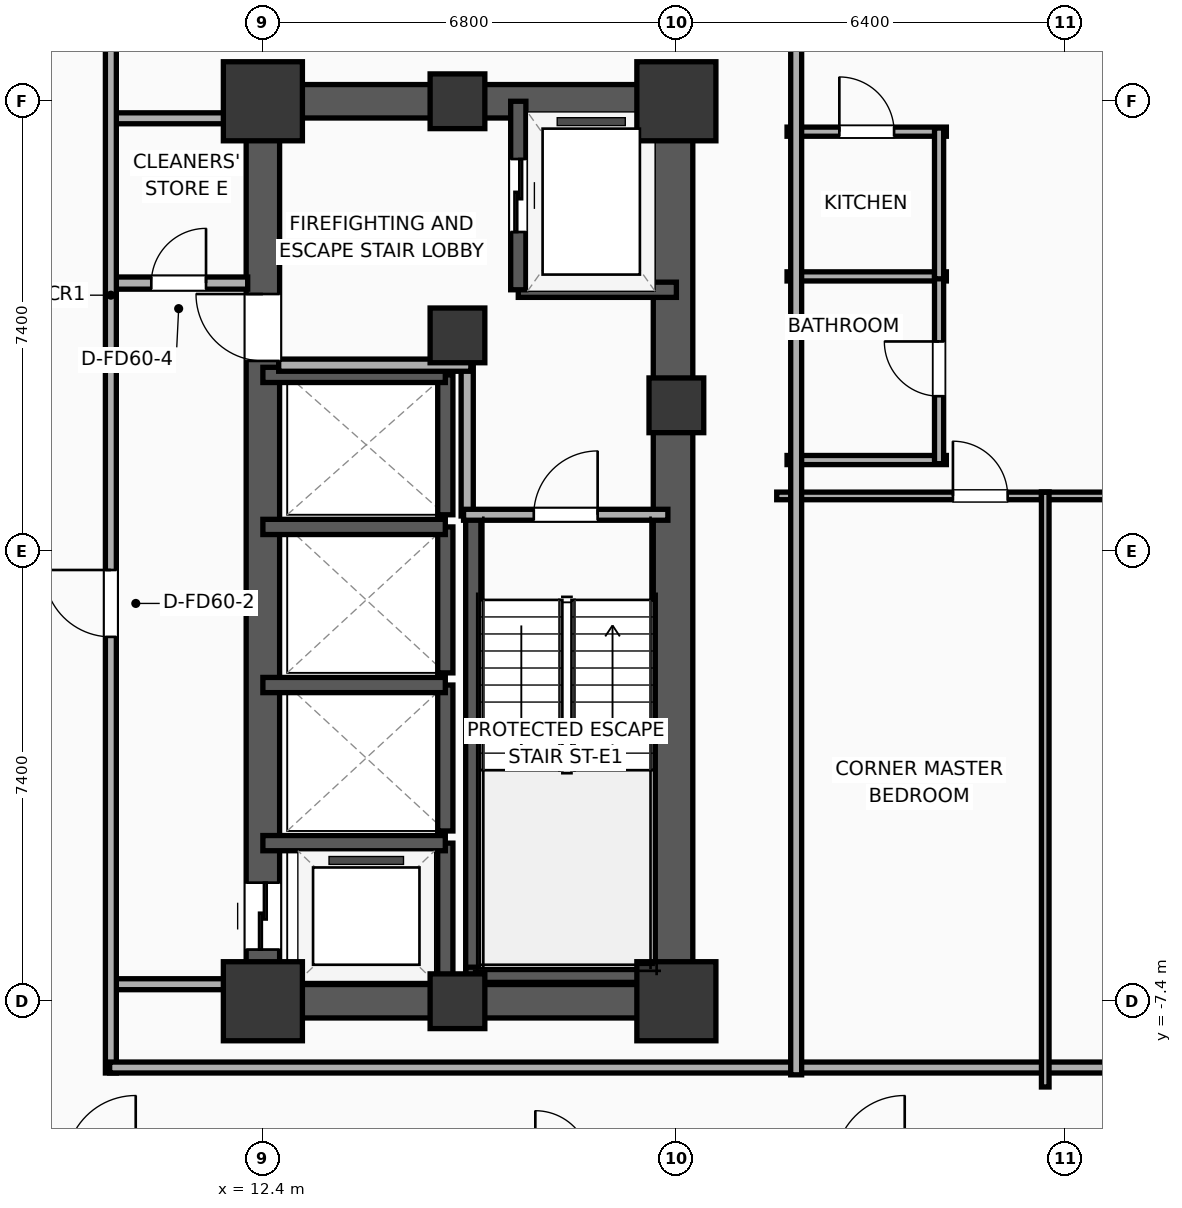
"""IFC4 building model, lengths in metres.
Left out: names, types, materials, properties, quantities, classifications, styles, units other than length and angle.
Written with IfcOpenShell. Run it as: python <this file> out.ifc"""

import sys

from ifc_helpers import new_model, si_unit, direction, frame, frame_2d, origin, origin_2d, place, context, subcontext, project, spatial, rectangle, extrude, element, fill, save


model = new_model("IFC4")
c1 = context("Model", 3, precision=1e-05, world=origin(), true_north=direction((0.0, 1.0)))
c2 = subcontext(c1, "Body", "Model", "MODEL_VIEW")
j1 = project(units=[si_unit("LENGTHUNIT", "METRE"), si_unit("PLANEANGLEUNIT", "RADIAN")], contexts=[c1])
p1 = place(None, origin())
s1 = spatial("IfcSite", under=j1, at=p1, CompositionType="ELEMENT")
p2 = place(p1, origin())
s2 = spatial("IfcBuilding", under=s1, at=p2, CompositionType="ELEMENT")
p3 = place(p2, frame((0.0, 0.0, 124.8)))
s3 = spatial("IfcBuildingStorey", under=s2, at=p3, CompositionType="ELEMENT", Elevation=124.8)
p4 = place(p3, frame((12.4, -7.4, 0.0), z_axis=(0.0, 0.0, 1.0), x_axis=(1.0, 0.0, 0.0)))
e1 = element("IfcColumn", 1, at=p4, inside=s3, PredefinedType="COLUMN", context=c2, shape_type="SweptSolid", body=[
    extrude(rectangle(XDim=1.3, YDim=1.3, at=origin_2d()), origin(), (0.0, 0.0, 1.0), 3.9),
])
p5 = place(p3, frame((15.6, 3.55, 0.0), z_axis=(0.0, 0.0, 1.0), x_axis=(1.0, 0.0, 0.0)))
e2 = element("IfcColumn", 2, at=p5, inside=s3, PredefinedType="COLUMN", context=c2, shape_type="SweptSolid", body=[
    extrude(rectangle(XDim=0.9, YDim=0.9, at=origin_2d()), origin(), (0.0, 0.0, 1.0), 3.9),
])
p6 = place(p3, frame((12.4, 7.4, 0.0), z_axis=(0.0, 0.0, 1.0), x_axis=(1.0, 0.0, 0.0)))
e3 = element("IfcColumn", 3, at=p6, inside=s3, PredefinedType="COLUMN", context=c2, shape_type="SweptSolid", body=[
    extrude(rectangle(XDim=1.3, YDim=1.3, at=origin_2d()), origin(), (0.0, 0.0, 1.0), 3.9),
])
for number, where, z_axis, x_axis in (
    (4, (15.6, -7.4, 0.0), (0.0, 0.0, 1.0), (1.0, 0.0, 0.0)),
    (5, (15.6, 7.4, 0.0), (0.0, 0.0, 1.0), (1.0, 0.0, 0.0)),
):
    element("IfcColumn", number, at=place(p3, frame(where, z_axis=z_axis, x_axis=x_axis)), inside=s3, PredefinedType="COLUMN", context=c2, shape_type="SweptSolid", body=[
        extrude(rectangle(XDim=0.9, YDim=0.9, at=origin_2d()), origin(), (0.0, 0.0, 1.0), 3.9),
    ])
p7 = place(p3, frame((19.2, -7.4, 0.0), z_axis=(0.0, 0.0, 1.0), x_axis=(1.0, 0.0, 0.0)))
e6 = element("IfcColumn", 6, at=p7, inside=s3, PredefinedType="COLUMN", context=c2, shape_type="SweptSolid", body=[
    extrude(rectangle(XDim=1.3, YDim=1.3, at=origin_2d()), origin(), (0.0, 0.0, 1.0), 3.9),
])
p8 = place(p3, frame((19.2, 2.4, 0.0), z_axis=(0.0, 0.0, 1.0), x_axis=(1.0, 0.0, 0.0)))
e7 = element("IfcColumn", 7, at=p8, inside=s3, PredefinedType="COLUMN", context=c2, shape_type="SweptSolid", body=[
    extrude(rectangle(XDim=0.9, YDim=0.9, at=origin_2d()), origin(), (0.0, 0.0, 1.0), 3.9),
])
p9 = place(p3, frame((19.2, 7.4, 0.0), z_axis=(0.0, 0.0, 1.0), x_axis=(1.0, 0.0, 0.0)))
e8 = element("IfcColumn", 8, at=p9, inside=s3, PredefinedType="COLUMN", context=c2, shape_type="SweptSolid", body=[
    extrude(rectangle(XDim=1.3, YDim=1.3, at=origin_2d()), origin(), (0.0, 0.0, 1.0), 3.9),
])
for number, where, z_axis, x_axis in (
    (9, (12.125, -7.4, 0.0), (0.0, 0.0, 1.0), (1.0, 0.0, 0.0)),
    (10, (12.125, 7.4, 0.0), (0.0, 0.0, 1.0), (1.0, 0.0, 0.0)),
):
    element("IfcWall", number, at=place(p3, frame(where, z_axis=z_axis, x_axis=x_axis)), inside=s3, PredefinedType="SHEAR", context=c2, shape_type="SweptSolid", body=[
        extrude(rectangle(XDim=7.35, YDim=0.55, at=frame_2d((3.675, 0.0))), origin(), (0.0, 0.0, 1.0), 3.65),
    ])
p10 = place(p3, frame((12.4, -7.4, 0.0), z_axis=(0.0, 0.0, 1.0), x_axis=(0.0, 1.0, 0.0)))
e11 = element("IfcWall", 11, at=p10, inside=s3, PredefinedType="SHEAR", context=c2, shape_type="SweptSolid", body=[
    extrude(rectangle(XDim=14.8, YDim=0.55, at=frame_2d((7.4, 0.0))), origin(), (0.0, 0.0, 1.0), 3.65),
])
p11 = place(p10, frame((0.85, 0.0, 0.0)))
e12 = element("IfcOpeningElement", 12, at=p11, cuts=e11, PredefinedType="OPENING", context=c2, shape_type="SweptSolid", body=[
    extrude(rectangle(XDim=1.1, YDim=2.05, at=frame_2d((0.55, 1.025))), frame((0.0, 0.285, 0.0), z_axis=(0.0, -1.0, 0.0), x_axis=(1.0, 0.0, 0.0)), (0.0, 0.0, 1.0), 0.57),
])
p12 = place(p10, frame((10.53, 0.0, 0.0)))
e13 = element("IfcOpeningElement", 13, at=p12, cuts=e11, PredefinedType="OPENING", context=c2, shape_type="SweptSolid", body=[
    extrude(rectangle(XDim=1.1, YDim=2.05, at=frame_2d((0.55, 1.025))), frame((0.0, 0.285, 0.0), z_axis=(0.0, -1.0, 0.0), x_axis=(1.0, 0.0, 0.0)), (0.0, 0.0, 1.0), 0.57),
])
p13 = place(p3, frame((19.145, -7.4, 0.0), z_axis=(0.0, 0.0, 1.0), x_axis=(0.0, 1.0, 0.0)))
e14 = element("IfcWall", 14, at=p13, inside=s3, PredefinedType="SHEAR", context=c2, shape_type="SweptSolid", body=[
    extrude(rectangle(XDim=14.8, YDim=0.65, at=frame_2d((7.4, 0.0))), origin(), (0.0, 0.0, 1.0), 3.65),
])
p14 = place(p3, frame((15.86, -7.085, 0.0), z_axis=(0.0, 0.0, 1.0), x_axis=(0.0, 1.0, 0.0)))
e15 = element("IfcWall", 15, at=p14, inside=s3, PredefinedType="SOLIDWALL", context=c2, shape_type="SweptSolid", body=[
    extrude(rectangle(XDim=7.685, YDim=0.25, at=frame_2d((3.843, 0.0))), origin(), (0.0, 0.0, 1.0), 3.65),
])
p15 = place(p3, frame((15.74, -6.965, 0.0), z_axis=(0.0, 0.0, 1.0), x_axis=(1.0, 0.0, 0.0)))
e16 = element("IfcWall", 16, at=p15, inside=s3, PredefinedType="SOLIDWALL", context=c2, shape_type="SweptSolid", body=[
    extrude(rectangle(XDim=3.46, YDim=0.25, at=frame_2d((1.73, 0.0))), origin(), (0.0, 0.0, 1.0), 3.65),
])
p16 = place(p3, frame((16.6, 4.3, 0.0), z_axis=(0.0, 0.0, 1.0), x_axis=(1.0, 0.0, 0.0)))
e17 = element("IfcWall", 17, at=p16, inside=s3, PredefinedType="SOLIDWALL", context=c2, shape_type="SweptSolid", body=[
    extrude(rectangle(XDim=2.6, YDim=0.25, at=frame_2d((1.3, 0.0))), origin(), (0.0, 0.0, 1.0), 3.65),
])
p17 = place(p3, frame((16.6, 7.4, 0.0), z_axis=(0.0, 0.0, 1.0), x_axis=(0.0, -1.0, 0.0)))
e18 = element("IfcWall", 18, at=p17, inside=s3, PredefinedType="SOLIDWALL", context=c2, shape_type="SweptSolid", body=[
    extrude(rectangle(XDim=3.1, YDim=0.25, at=frame_2d((1.55, 0.0))), origin(), (0.0, 0.0, 1.0), 3.65),
])
p18 = place(p17, frame((0.95, 0.0, 0.0)))
e19 = element("IfcOpeningElement", 19, at=p18, cuts=e18, PredefinedType="OPENING", context=c2, shape_type="SweptSolid", body=[
    extrude(rectangle(XDim=1.2, YDim=2.05, at=frame_2d((0.6, 1.025))), frame((0.0, 0.135, 0.0), z_axis=(0.0, -1.0, 0.0), x_axis=(1.0, 0.0, 0.0)), (0.0, 0.0, 1.0), 0.27),
])
p19 = place(p3, frame((15.4, -7.4, 0.0), z_axis=(0.0, 0.0, 1.0), x_axis=(0.0, 1.0, 0.0)))
e20 = element("IfcWall", 20, at=p19, inside=s3, PredefinedType="SOLIDWALL", context=c2, shape_type="SweptSolid", body=[
    extrude(rectangle(XDim=2.6, YDim=0.25, at=frame_2d((1.3, 0.0))), origin(), (0.0, 0.0, 1.0), 3.65),
])
p20 = place(p3, frame((15.4, -4.8, 0.0), z_axis=(0.0, 0.0, 1.0), x_axis=(-1.0, 0.0, 0.0)))
e21 = element("IfcWall", 21, at=p20, inside=s3, PredefinedType="SOLIDWALL", context=c2, shape_type="SweptSolid", body=[
    extrude(rectangle(XDim=3.0, YDim=0.25, at=frame_2d((1.5, 0.0))), origin(), (0.0, 0.0, 1.0), 3.65),
])
p21 = place(p3, frame((15.4, -4.6, 0.0), z_axis=(0.0, 0.0, 1.0), x_axis=(0.0, 1.0, 0.0)))
e22 = element("IfcWall", 22, at=p21, inside=s3, PredefinedType="SOLIDWALL", context=c2, shape_type="SweptSolid", body=[
    extrude(rectangle(XDim=2.4, YDim=0.25, at=frame_2d((1.2, 0.0))), origin(), (0.0, 0.0, 1.0), 3.65),
])
p22 = place(p3, frame((15.4, -2.2, 0.0), z_axis=(0.0, 0.0, 1.0), x_axis=(-1.0, 0.0, 0.0)))
e23 = element("IfcWall", 23, at=p22, inside=s3, PredefinedType="SOLIDWALL", context=c2, shape_type="SweptSolid", body=[
    extrude(rectangle(XDim=3.0, YDim=0.25, at=frame_2d((1.5, 0.0))), origin(), (0.0, 0.0, 1.0), 3.65),
])
p23 = place(p3, frame((15.4, -2.0, 0.0), z_axis=(0.0, 0.0, 1.0), x_axis=(0.0, 1.0, 0.0)))
e24 = element("IfcWall", 24, at=p23, inside=s3, PredefinedType="SOLIDWALL", context=c2, shape_type="SweptSolid", body=[
    extrude(rectangle(XDim=2.4, YDim=0.25, at=frame_2d((1.2, 0.0))), origin(), (0.0, 0.0, 1.0), 3.65),
])
p24 = place(p3, frame((15.4, 0.4, 0.0), z_axis=(0.0, 0.0, 1.0), x_axis=(-1.0, 0.0, 0.0)))
e25 = element("IfcWall", 25, at=p24, inside=s3, PredefinedType="SOLIDWALL", context=c2, shape_type="SweptSolid", body=[
    extrude(rectangle(XDim=3.0, YDim=0.25, at=frame_2d((1.5, 0.0))), origin(), (0.0, 0.0, 1.0), 3.65),
])
p25 = place(p3, frame((15.4, 0.6, 0.0), z_axis=(0.0, 0.0, 1.0), x_axis=(0.0, 1.0, 0.0)))
e26 = element("IfcWall", 26, at=p25, inside=s3, PredefinedType="SOLIDWALL", context=c2, shape_type="SweptSolid", body=[
    extrude(rectangle(XDim=2.3, YDim=0.25, at=frame_2d((1.15, 0.0))), origin(), (0.0, 0.0, 1.0), 3.65),
])
p26 = place(p3, frame((15.4, 2.9, 0.0), z_axis=(0.0, 0.0, 1.0), x_axis=(-1.0, 0.0, 0.0)))
e27 = element("IfcWall", 27, at=p26, inside=s3, PredefinedType="SOLIDWALL", context=c2, shape_type="SweptSolid", body=[
    extrude(rectangle(XDim=3.0, YDim=0.25, at=frame_2d((1.5, 0.0))), origin(), (0.0, 0.0, 1.0), 3.65),
])
p27 = place(p3, frame((15.76, 0.58, 0.0), z_axis=(0.0, 0.0, 1.0), x_axis=(0.0, 1.0, 0.0)))
e28 = element("IfcWall", 28, at=p27, inside=s3, PredefinedType="PARTITIONING", context=c2, shape_type="SweptSolid", body=[
    extrude(rectangle(XDim=2.52, YDim=0.2, at=frame_2d((1.26, 0.0))), origin(), (0.0, 0.0, 1.0), 3.65),
])
p28 = place(p3, frame((12.66, 3.06, 0.0), z_axis=(0.0, 0.0, 1.0), x_axis=(1.0, 0.0, 0.0)))
e29 = element("IfcWall", 29, at=p28, inside=s3, PredefinedType="PARTITIONING", context=c2, shape_type="SweptSolid", body=[
    extrude(rectangle(XDim=3.16, YDim=0.2, at=frame_2d((1.58, 0.0))), origin(), (0.0, 0.0, 1.0), 3.65),
])
p29 = place(p3, frame((15.7, 0.6, 0.0), z_axis=(0.0, 0.0, 1.0), x_axis=(1.0, 0.0, 0.0)))
e30 = element("IfcWall", 30, at=p29, inside=s3, PredefinedType="PARTITIONING", context=c2, shape_type="SweptSolid", body=[
    extrude(rectangle(XDim=3.36, YDim=0.18, at=frame_2d((1.68, 0.0))), origin(), (0.0, 0.0, 1.0), 3.65),
])
p30 = place(p29, frame((1.155, 0.0, 0.0)))
e31 = element("IfcOpeningElement", 31, at=p30, cuts=e30, PredefinedType="OPENING", context=c2, shape_type="SweptSolid", body=[
    extrude(rectangle(XDim=1.05, YDim=2.05, at=frame_2d((0.525, 1.025))), frame((0.0, 0.1, 0.0), z_axis=(0.0, -1.0, 0.0), x_axis=(1.0, 0.0, 0.0)), (0.0, 0.0, 1.0), 0.2),
])
p31 = place(p3, frame((9.88, 4.41, 0.0), z_axis=(0.0, 0.0, 1.0), x_axis=(1.0, 0.0, 0.0)))
e32 = element("IfcWall", 32, at=p31, inside=s3, PredefinedType="PARTITIONING", context=c2, shape_type="SweptSolid", body=[
    extrude(rectangle(XDim=2.27, YDim=0.2, at=frame_2d((1.135, 0.0))), origin(), (0.0, 0.0, 1.0), 3.65),
])
p32 = place(p31, frame((0.685, 0.0, 0.0)))
e33 = element("IfcOpeningElement", 33, at=p32, cuts=e32, PredefinedType="OPENING", context=c2, shape_type="SweptSolid", body=[
    extrude(rectangle(XDim=0.9, YDim=2.05, at=frame_2d((0.45, 1.025))), frame((0.0, 0.11, 0.0), z_axis=(0.0, -1.0, 0.0), x_axis=(1.0, 0.0, 0.0)), (0.0, 0.0, 1.0), 0.22),
])
for number, where, z_axis, x_axis in (
    (34, (9.88, 7.12, 0.0), (0.0, 0.0, 1.0), (1.0, 0.0, 0.0)),
    (35, (9.88, -7.12, 0.0), (0.0, 0.0, 1.0), (1.0, 0.0, 0.0)),
):
    element("IfcWall", number, at=place(p3, frame(where, z_axis=z_axis, x_axis=x_axis)), inside=s3, PredefinedType="PARTITIONING", context=c2, shape_type="SweptSolid", body=[
        extrude(rectangle(XDim=2.27, YDim=0.18, at=frame_2d((1.135, 0.0))), origin(), (0.0, 0.0, 1.0), 3.65),
    ])
p33 = place(p3, frame((9.9, -8.58, 0.0), z_axis=(0.0, 0.0, 1.0), x_axis=(0.0, 1.0, 0.0)))
e36 = element("IfcWall", 36, at=p33, inside=s3, PredefinedType="PARTITIONING", context=c2, shape_type="SweptSolid", body=[
    extrude(rectangle(XDim=17.16, YDim=0.18, at=frame_2d((8.58, 0.0))), origin(), (0.0, 0.0, 1.0), 3.65),
])
p34 = place(p33, frame((7.172, 0.0, 0.0)))
e37 = element("IfcOpeningElement", 37, at=p34, cuts=e36, PredefinedType="OPENING", context=c2, shape_type="SweptSolid", body=[
    extrude(rectangle(XDim=1.1, YDim=2.05, at=frame_2d((0.55, 1.025))), frame((0.0, 0.1, 0.0), z_axis=(0.0, -1.0, 0.0), x_axis=(1.0, 0.0, 0.0)), (0.0, 0.0, 1.0), 0.2),
])
p35 = place(p3, frame((9.88, -8.49, 0.0), z_axis=(0.0, 0.0, 1.0), x_axis=(1.0, 0.0, 0.0)))
e38 = element("IfcWall", 38, at=p35, inside=s3, PredefinedType="PARTITIONING", context=c2, shape_type="SweptSolid", body=[
    extrude(rectangle(XDim=23.33, YDim=0.18, at=frame_2d((11.665, 0.0))), origin(), (0.0, 0.0, 1.0), 3.65),
])
p36 = place(p3, frame((21.02, 6.9, 0.0), z_axis=(0.0, 0.0, 1.0), x_axis=(1.0, 0.0, 0.0)))
e39 = element("IfcWall", 39, at=p36, inside=s3, PredefinedType="PLUMBINGWALL", context=c2, shape_type="SweptSolid", body=[
    extrude(rectangle(XDim=2.62, YDim=0.15, at=frame_2d((1.31, 0.0))), origin(), (0.0, 0.0, 1.0), 3.65),
])
p37 = place(p36, frame((0.86, 0.0, 0.0)))
e40 = element("IfcOpeningElement", 40, at=p37, cuts=e39, PredefinedType="OPENING", context=c2, shape_type="SweptSolid", body=[
    extrude(rectangle(XDim=0.9, YDim=2.05, at=frame_2d((0.45, 1.025))), frame((0.0, 0.085, 0.0), z_axis=(0.0, -1.0, 0.0), x_axis=(1.0, 0.0, 0.0)), (0.0, 0.0, 1.0), 0.17),
])
for number, where, z_axis, x_axis in (
    (41, (21.02, 4.52, 0.0), (0.0, 0.0, 1.0), (1.0, 0.0, 0.0)),
    (42, (21.02, 1.5, 0.0), (0.0, 0.0, 1.0), (1.0, 0.0, 0.0)),
):
    element("IfcWall", number, at=place(p3, frame(where, z_axis=z_axis, x_axis=x_axis)), inside=s3, PredefinedType="PLUMBINGWALL", context=c2, shape_type="SweptSolid", body=[
        extrude(rectangle(XDim=2.62, YDim=0.15, at=frame_2d((1.31, 0.0))), origin(), (0.0, 0.0, 1.0), 3.65),
    ])
p38 = place(p3, frame((23.52, 1.44, 0.0), z_axis=(0.0, 0.0, 1.0), x_axis=(0.0, 1.0, 0.0)))
e43 = element("IfcWall", 43, at=p38, inside=s3, PredefinedType="PLUMBINGWALL", context=c2, shape_type="SweptSolid", body=[
    extrude(rectangle(XDim=3.12, YDim=0.15, at=frame_2d((1.56, 0.0))), origin(), (0.0, 0.0, 1.0), 3.65),
])
p39 = place(p38, frame((1.11, 0.0, 0.0)))
e44 = element("IfcOpeningElement", 44, at=p39, cuts=e43, PredefinedType="OPENING", context=c2, shape_type="SweptSolid", body=[
    extrude(rectangle(XDim=0.9, YDim=2.05, at=frame_2d((0.45, 1.025))), frame((0.0, 0.085, 0.0), z_axis=(0.0, -1.0, 0.0), x_axis=(1.0, 0.0, 0.0)), (0.0, 0.0, 1.0), 0.17),
])
p40 = place(p3, frame((23.52, 4.48, 0.0), z_axis=(0.0, 0.0, 1.0), x_axis=(0.0, 1.0, 0.0)))
e45 = element("IfcWall", 45, at=p40, inside=s3, PredefinedType="PLUMBINGWALL", context=c2, shape_type="SweptSolid", body=[
    extrude(rectangle(XDim=2.48, YDim=0.15, at=frame_2d((1.24, 0.0))), origin(), (0.0, 0.0, 1.0), 3.65),
])
p41 = place(p3, frame((20.85, 0.91, 0.0), z_axis=(0.0, 0.0, 1.0), x_axis=(1.0, 0.0, 0.0)))
e46 = element("IfcWall", 46, at=p41, inside=s3, PredefinedType="PARTITIONING", context=c2, shape_type="SweptSolid", body=[
    extrude(rectangle(XDim=4.479, YDim=0.125, at=frame_2d((2.239, 0.0))), origin(), (0.0, 0.0, 1.0), 3.65),
])
p42 = place(p41, frame((2.898, 0.0, 0.0)))
e47 = element("IfcOpeningElement", 47, at=p42, cuts=e46, PredefinedType="OPENING", context=c2, shape_type="SweptSolid", body=[
    extrude(rectangle(XDim=0.9, YDim=2.05, at=frame_2d((0.45, 1.025))), frame((0.0, 0.073, 0.0), z_axis=(0.0, -1.0, 0.0), x_axis=(1.0, 0.0, 0.0)), (0.0, 0.0, 1.0), 0.145),
])
p43 = place(p3, frame((25.204, 0.91, 0.0), z_axis=(0.0, 0.0, 1.0), x_axis=(1.0, 0.0, 0.0)))
e48 = element("IfcWall", 48, at=p43, inside=s3, PredefinedType="PARTITIONING", context=c2, shape_type="SweptSolid", body=[
    extrude(rectangle(XDim=4.101, YDim=0.125, at=frame_2d((2.05, 0.0))), origin(), (0.0, 0.0, 1.0), 3.65),
])
p44 = place(p43, frame((1.601, 0.0, 0.0)))
e49 = element("IfcOpeningElement", 49, at=p44, cuts=e48, PredefinedType="OPENING", context=c2, shape_type="SweptSolid", body=[
    extrude(rectangle(XDim=0.9, YDim=2.05, at=frame_2d((0.45, 1.025))), frame((0.0, 0.073, 0.0), z_axis=(0.0, -1.0, 0.0), x_axis=(1.0, 0.0, 0.0)), (0.0, 0.0, 1.0), 0.145),
])
p45 = place(p3, frame((25.266, -8.81, 0.0), z_axis=(0.0, 0.0, 1.0), x_axis=(0.0, 1.0, 0.0)))
e50 = element("IfcWall", 50, at=p45, inside=s3, PredefinedType="PARTITIONING", context=c2, shape_type="SweptSolid", body=[
    extrude(rectangle(XDim=9.78, YDim=0.125, at=frame_2d((4.89, 0.0))), origin(), (0.0, 0.0, 1.0), 3.65),
])
p46 = place(p3, frame((21.17, -8.61, 0.0), z_axis=(0.0, 0.0, 1.0), x_axis=(0.0, 1.0, 0.0)))
e51 = element("IfcWall", 51, at=p46, inside=s3, PredefinedType="PARTITIONING", context=c2, shape_type="SweptSolid", body=[
    extrude(rectangle(XDim=17.22, YDim=0.18, at=frame_2d((8.61, 0.0))), origin(), (0.0, 0.0, 1.0), 3.65),
])
p47 = place(p18, origin())
e52 = element("IfcDoor", 52, at=p47, inside=s3, OperationType="SLIDING_TO_LEFT", PredefinedType="DOOR", context=c2, shape_type="SweptSolid", body=[
    extrude(rectangle(XDim=1.2, YDim=2.05, at=frame_2d((0.6, 1.025))), frame((0.0, 0.025, 0.0), z_axis=(0.0, -1.0, 0.0), x_axis=(1.0, 0.0, 0.0)), (0.0, 0.0, 1.0), 0.05),
])
fill(e19, e52)
p48 = place(p11, origin())
e53 = element("IfcDoor", 53, at=p48, inside=s3, OperationType="SLIDING_TO_LEFT", PredefinedType="DOOR", context=c2, shape_type="SweptSolid", body=[
    extrude(rectangle(XDim=1.1, YDim=2.05, at=frame_2d((0.55, 1.025))), frame((0.0, 0.025, 0.0), z_axis=(0.0, -1.0, 0.0), x_axis=(1.0, 0.0, 0.0)), (0.0, 0.0, 1.0), 0.05),
])
fill(e12, e53)
p49 = place(p30, origin())
e54 = element("IfcDoor", 54, at=p49, inside=s3, OperationType="SINGLE_SWING_RIGHT", PredefinedType="DOOR", context=c2, shape_type="SweptSolid", body=[
    extrude(rectangle(XDim=1.05, YDim=2.05, at=frame_2d((0.525, 1.025))), frame((0.0, 0.025, 0.0), z_axis=(0.0, -1.0, 0.0), x_axis=(1.0, 0.0, 0.0)), (0.0, 0.0, 1.0), 0.05),
])
fill(e31, e54)
p50 = place(p32, origin())
e55 = element("IfcDoor", 55, at=p50, inside=s3, OperationType="SINGLE_SWING_RIGHT", PredefinedType="DOOR", context=c2, shape_type="SweptSolid", body=[
    extrude(rectangle(XDim=0.9, YDim=2.05, at=frame_2d((0.45, 1.025))), frame((0.0, 0.025, 0.0), z_axis=(0.0, -1.0, 0.0), x_axis=(1.0, 0.0, 0.0)), (0.0, 0.0, 1.0), 0.05),
])
fill(e33, e55)
p51 = place(p34, origin())
e56 = element("IfcDoor", 56, at=p51, inside=s3, OperationType="SINGLE_SWING_RIGHT", PredefinedType="DOOR", context=c2, shape_type="SweptSolid", body=[
    extrude(rectangle(XDim=1.1, YDim=2.05, at=frame_2d((0.55, 1.025))), frame((0.0, 0.025, 0.0), z_axis=(0.0, -1.0, 0.0), x_axis=(1.0, 0.0, 0.0)), (0.0, 0.0, 1.0), 0.05),
])
fill(e37, e56)
p52 = place(p37, origin())
e57 = element("IfcDoor", 57, at=p52, inside=s3, OperationType="SINGLE_SWING_LEFT", PredefinedType="DOOR", context=c2, shape_type="SweptSolid", body=[
    extrude(rectangle(XDim=0.9, YDim=2.05, at=frame_2d((0.45, 1.025))), frame((0.0, 0.025, 0.0), z_axis=(0.0, -1.0, 0.0), x_axis=(1.0, 0.0, 0.0)), (0.0, 0.0, 1.0), 0.05),
])
fill(e40, e57)
p53 = place(p39, origin())
e58 = element("IfcDoor", 58, at=p53, inside=s3, OperationType="SINGLE_SWING_RIGHT", PredefinedType="DOOR", context=c2, shape_type="SweptSolid", body=[
    extrude(rectangle(XDim=0.9, YDim=2.05, at=frame_2d((0.45, 1.025))), frame((0.0, 0.025, 0.0), z_axis=(0.0, -1.0, 0.0), x_axis=(1.0, 0.0, 0.0)), (0.0, 0.0, 1.0), 0.05),
])
fill(e44, e58)
p54 = place(p42, origin())
e59 = element("IfcDoor", 59, at=p54, inside=s3, OperationType="SINGLE_SWING_LEFT", PredefinedType="DOOR", context=c2, shape_type="SweptSolid", body=[
    extrude(rectangle(XDim=0.9, YDim=2.05, at=frame_2d((0.45, 1.025))), frame((0.0, 0.025, 0.0), z_axis=(0.0, -1.0, 0.0), x_axis=(1.0, 0.0, 0.0)), (0.0, 0.0, 1.0), 0.05),
])
fill(e47, e59)
p55 = place(p12, origin())
e60 = element("IfcDoor", 60, at=p55, inside=s3, OperationType="SINGLE_SWING_RIGHT", PredefinedType="DOOR", context=c2, shape_type="SweptSolid", body=[
    extrude(rectangle(XDim=1.1, YDim=2.05, at=frame_2d((0.55, 1.025))), frame((0.0, 0.025, 0.0), z_axis=(0.0, -1.0, 0.0), x_axis=(1.0, 0.0, 0.0)), (0.0, 0.0, 1.0), 0.05),
])
fill(e13, e60)
save(model, sys.argv[1])
